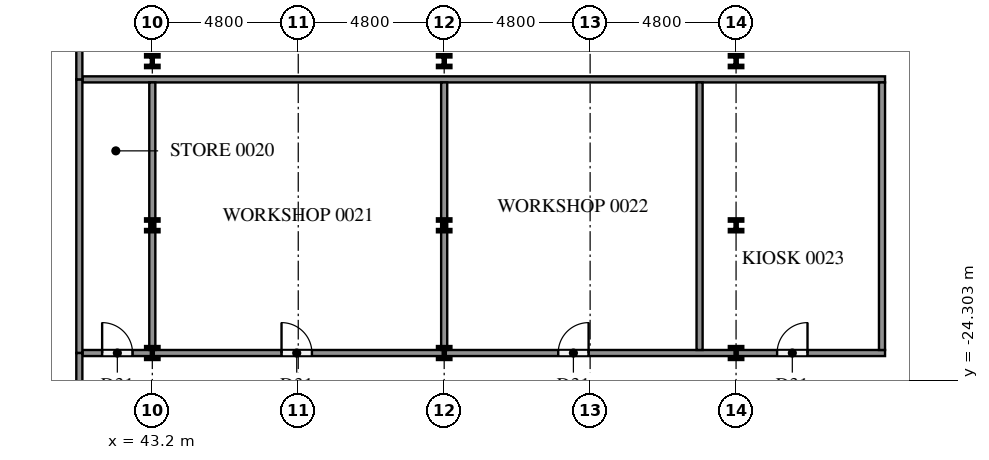
"""IFC4 building model, lengths in metres.
Left out: names, types, materials, properties, quantities, classifications, styles, units other than length and angle.
Written with IfcOpenShell. Run it as: python <this file> out.ifc"""

import sys

from ifc_helpers import new_model, si_unit, direction, frame, frame_2d, origin, origin_2d, place, context, subcontext, project, spatial, rectangle, i_section, extrude, element, fill, save


model = new_model("IFC4")
c1 = context("Model", 3, precision=1e-05, world=origin(), true_north=direction((0.0, 1.0)))
c2 = subcontext(c1, "Body", "Model", "MODEL_VIEW")
j1 = project(units=[si_unit("LENGTHUNIT", "METRE"), si_unit("PLANEANGLEUNIT", "RADIAN")], contexts=[c1])
p1 = place(None, origin())
s1 = spatial("IfcSite", under=j1, at=p1, CompositionType="ELEMENT")
p2 = place(p1, origin())
s2 = spatial("IfcBuilding", under=s1, at=p2, CompositionType="ELEMENT")
p3 = place(p2, origin())
s3 = spatial("IfcBuildingStorey", under=s2, at=p3, CompositionType="ELEMENT", Elevation=0.0)
for number, where, z_axis, x_axis in (
    (1, (43.2, -23.4, 0.0), (0.0, 0.0, 1.0), (1.0, 0.0, 0.0)),
    (2, (43.2, -19.2, 0.0), (0.0, 0.0, 1.0), (1.0, 0.0, 0.0)),
    (3, (43.2, -13.8, 0.0), (0.0, 0.0, 1.0), (1.0, 0.0, 0.0)),
    (4, (52.8, -23.4, 0.0), (0.0, 0.0, 1.0), (1.0, 0.0, 0.0)),
    (5, (52.8, -19.2, 0.0), (0.0, 0.0, 1.0), (1.0, 0.0, 0.0)),
    (6, (52.8, -13.8, 0.0), (0.0, 0.0, 1.0), (1.0, 0.0, 0.0)),
    (7, (62.4, -23.4, 0.0), (0.0, 0.0, 1.0), (1.0, 0.0, 0.0)),
    (8, (62.4, -19.2, 0.0), (0.0, 0.0, 1.0), (1.0, 0.0, 0.0)),
    (9, (62.4, -13.8, 0.0), (0.0, 0.0, 1.0), (1.0, 0.0, 0.0)),
):
    element("IfcColumn", number, at=place(p3, frame(where, z_axis=z_axis, x_axis=x_axis)), inside=s3, PredefinedType="COLUMN", context=c2, shape_type="SweptSolid", body=[
        extrude(i_section(OverallWidth=0.396, OverallDepth=0.381, WebThickness=0.019, FlangeThickness=0.03, at=origin_2d()), origin(), (0.0, 0.0, 1.0), 5.7),
    ])
p4 = place(p3, frame((40.9, -23.4, 0.0), z_axis=(0.0, 0.0, 1.0), x_axis=(1.0, 0.0, 0.0)))
e10 = element("IfcWall", 10, at=p4, inside=s3, PredefinedType="PARTITIONING", context=c2, shape_type="SweptSolid", body=[
    extrude(rectangle(XDim=26.4, YDim=0.2, at=frame_2d((13.2, 0.0))), origin(), (0.0, 0.0, 1.0), 5.7),
])
p5 = place(p4, frame((0.65, 0.0, 0.0)))
e11 = element("IfcOpeningElement", 11, at=p5, cuts=e10, PredefinedType="OPENING", context=c2, shape_type="SweptSolid", body=[
    extrude(rectangle(XDim=1.0, YDim=2.1, at=frame_2d((0.5, 1.05))), frame((0.0, 0.11, 0.0), z_axis=(0.0, -1.0, 0.0), x_axis=(1.0, 0.0, 0.0)), (0.0, 0.0, 1.0), 0.22),
])
p6 = place(p4, frame((6.55, 0.0, 0.0)))
e12 = element("IfcOpeningElement", 12, at=p6, cuts=e10, PredefinedType="OPENING", context=c2, shape_type="SweptSolid", body=[
    extrude(rectangle(XDim=1.0, YDim=2.1, at=frame_2d((0.5, 1.05))), frame((0.0, 0.11, 0.0), z_axis=(0.0, -1.0, 0.0), x_axis=(1.0, 0.0, 0.0)), (0.0, 0.0, 1.0), 0.22),
])
p7 = place(p4, frame((15.65, 0.0, 0.0)))
e13 = element("IfcOpeningElement", 13, at=p7, cuts=e10, PredefinedType="OPENING", context=c2, shape_type="SweptSolid", body=[
    extrude(rectangle(XDim=1.0, YDim=2.1, at=frame_2d((0.5, 1.05))), frame((0.0, 0.11, 0.0), z_axis=(0.0, -1.0, 0.0), x_axis=(1.0, 0.0, 0.0)), (0.0, 0.0, 1.0), 0.22),
])
p8 = place(p4, frame((22.85, 0.0, 0.0)))
e14 = element("IfcOpeningElement", 14, at=p8, cuts=e10, PredefinedType="OPENING", context=c2, shape_type="SweptSolid", body=[
    extrude(rectangle(XDim=1.0, YDim=2.1, at=frame_2d((0.5, 1.05))), frame((0.0, 0.11, 0.0), z_axis=(0.0, -1.0, 0.0), x_axis=(1.0, 0.0, 0.0)), (0.0, 0.0, 1.0), 0.22),
])
p9 = place(p3, frame((40.9, -14.4, 0.0), z_axis=(0.0, 0.0, 1.0), x_axis=(1.0, 0.0, 0.0)))
e15 = element("IfcWall", 15, at=p9, inside=s3, PredefinedType="PARTITIONING", context=c2, shape_type="SweptSolid", body=[
    extrude(rectangle(XDim=26.4, YDim=0.2, at=frame_2d((13.2, 0.0))), origin(), (0.0, 0.0, 1.0), 5.7),
])
p10 = place(p3, frame((40.8, -23.4, 0.0), z_axis=(0.0, 0.0, 1.0), x_axis=(0.0, 1.0, 0.0)))
e16 = element("IfcWall", 16, at=p10, inside=s3, PredefinedType="PARTITIONING", context=c2, shape_type="SweptSolid", body=[
    extrude(rectangle(XDim=9.0, YDim=0.2, at=frame_2d((4.5, 0.0))), origin(), (0.0, 0.0, 1.0), 5.7),
])
p11 = place(p3, frame((40.8, -26.4, 0.0), z_axis=(0.0, 0.0, 1.0), x_axis=(0.0, 1.0, 0.0)))
e17 = element("IfcWall", 17, at=p11, inside=s3, PredefinedType="PARTITIONING", context=c2, shape_type="SweptSolid", body=[
    extrude(rectangle(XDim=3.0, YDim=0.2, at=frame_2d((1.5, 0.0))), origin(), (0.0, 0.0, 1.0), 5.7),
])
p12 = place(p3, frame((40.8, -14.4, 0.0), z_axis=(0.0, 0.0, 1.0), x_axis=(0.0, 1.0, 0.0)))
e18 = element("IfcWall", 18, at=p12, inside=s3, PredefinedType="PARTITIONING", context=c2, shape_type="SweptSolid", body=[
    extrude(rectangle(XDim=2.4, YDim=0.2, at=frame_2d((1.2, 0.0))), origin(), (0.0, 0.0, 1.0), 5.7),
])
for number, where, z_axis, x_axis in (
    (19, (43.2, -23.3, 0.0), (0.0, 0.0, 1.0), (0.0, 1.0, 0.0)),
    (20, (52.8, -23.3, 0.0), (0.0, 0.0, 1.0), (0.0, 1.0, 0.0)),
    (21, (61.2, -23.3, 0.0), (0.0, 0.0, 1.0), (0.0, 1.0, 0.0)),
    (22, (67.2, -23.3, 0.0), (0.0, 0.0, 1.0), (0.0, 1.0, 0.0)),
):
    element("IfcWall", number, at=place(p3, frame(where, z_axis=z_axis, x_axis=x_axis)), inside=s3, PredefinedType="PARTITIONING", context=c2, shape_type="SweptSolid", body=[
        extrude(rectangle(XDim=8.8, YDim=0.2, at=frame_2d((4.4, 0.0))), origin(), (0.0, 0.0, 1.0), 5.7),
    ])
p13 = place(p5, origin())
e23 = element("IfcDoor", 23, at=p13, inside=s3, OperationType="SINGLE_SWING_LEFT", PredefinedType="DOOR", context=c2, shape_type="SweptSolid", body=[
    extrude(rectangle(XDim=1.0, YDim=2.1, at=frame_2d((0.5, 1.05))), frame((0.0, 0.025, 0.0), z_axis=(0.0, -1.0, 0.0), x_axis=(1.0, 0.0, 0.0)), (0.0, 0.0, 1.0), 0.05),
])
fill(e11, e23)
p14 = place(p6, origin())
e24 = element("IfcDoor", 24, at=p14, inside=s3, OperationType="SINGLE_SWING_LEFT", PredefinedType="DOOR", context=c2, shape_type="SweptSolid", body=[
    extrude(rectangle(XDim=1.0, YDim=2.1, at=frame_2d((0.5, 1.05))), frame((0.0, 0.025, 0.0), z_axis=(0.0, -1.0, 0.0), x_axis=(1.0, 0.0, 0.0)), (0.0, 0.0, 1.0), 0.05),
])
fill(e12, e24)
p15 = place(p7, origin())
e25 = element("IfcDoor", 25, at=p15, inside=s3, OperationType="SINGLE_SWING_RIGHT", PredefinedType="DOOR", context=c2, shape_type="SweptSolid", body=[
    extrude(rectangle(XDim=1.0, YDim=2.1, at=frame_2d((0.5, 1.05))), frame((0.0, 0.025, 0.0), z_axis=(0.0, -1.0, 0.0), x_axis=(1.0, 0.0, 0.0)), (0.0, 0.0, 1.0), 0.05),
])
fill(e13, e25)
p16 = place(p8, origin())
e26 = element("IfcDoor", 26, at=p16, inside=s3, OperationType="SINGLE_SWING_RIGHT", PredefinedType="DOOR", context=c2, shape_type="SweptSolid", body=[
    extrude(rectangle(XDim=1.0, YDim=2.1, at=frame_2d((0.5, 1.05))), frame((0.0, 0.025, 0.0), z_axis=(0.0, -1.0, 0.0), x_axis=(1.0, 0.0, 0.0)), (0.0, 0.0, 1.0), 0.05),
])
fill(e14, e26)
save(model, sys.argv[1])
